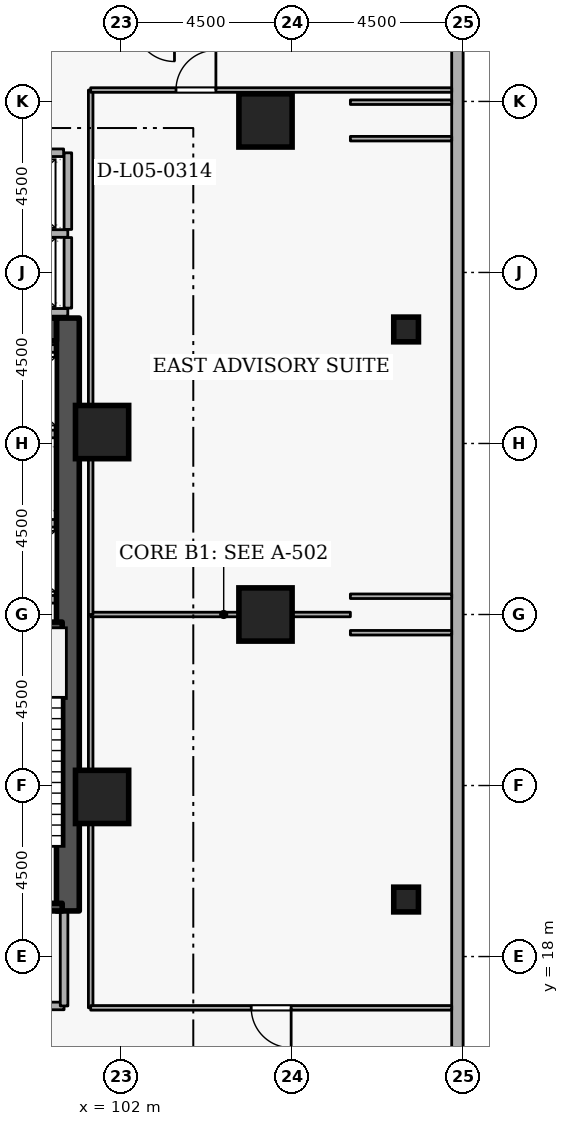
"""IFC4 building model, lengths in metres.
Left out: names, types, materials, properties, quantities, classifications, styles, units other than length and angle.
Written with IfcOpenShell. Run it as: python <this file> out.ifc"""

import sys

from ifc_helpers import new_model, si_unit, direction, frame, frame_2d, origin, origin_2d, place, context, subcontext, project, spatial, rectangle, extrude, element, fill, save


model = new_model("IFC4")
c1 = context("Model", 3, precision=1e-05, world=origin(), true_north=direction((0.0, 1.0)))
c2 = subcontext(c1, "Body", "Model", "MODEL_VIEW")
j1 = project(units=[si_unit("LENGTHUNIT", "METRE"), si_unit("PLANEANGLEUNIT", "RADIAN")], contexts=[c1])
p1 = place(None, origin())
s1 = spatial("IfcSite", under=j1, at=p1, CompositionType="ELEMENT")
p2 = place(p1, origin())
s2 = spatial("IfcBuilding", under=s1, at=p2, CompositionType="ELEMENT")
p3 = place(p2, frame((0.0, 0.0, 23.1)))
s3 = spatial("IfcBuildingStorey", under=s2, at=p3, CompositionType="ELEMENT", Elevation=23.1)
p4 = place(p3, frame((100.6, 19.2, 0.0), z_axis=(0.0, 0.0, 1.0), x_axis=(0.0, 1.0, 0.0)))
e1 = element("IfcWall", 1, at=p4, inside=s3, PredefinedType="SHEAR", context=c2, shape_type="SweptSolid", body=[
    extrude(rectangle(XDim=15.6, YDim=0.6, at=frame_2d((7.8, 0.0))), origin(), (0.0, 0.0, 1.0), 4.8),
])
p5 = place(p3, frame((94.6, 34.5, 0.0), z_axis=(0.0, 0.0, 1.0), x_axis=(1.0, 0.0, 0.0)))
e2 = element("IfcWall", 2, at=p5, inside=s3, PredefinedType="SHEAR", context=c2, shape_type="SweptSolid", body=[
    extrude(rectangle(XDim=5.7, YDim=0.6, at=frame_2d((2.85, 0.0))), origin(), (0.0, 0.0, 1.0), 4.8),
])
for number, where, z_axis, x_axis in (
    (3, (105.8, 27.0, 0.0), (0.0, 0.0, 1.0), (1.0, 0.0, 0.0)),
    (4, (105.8, 40.0, 0.0), (0.0, 0.0, 1.0), (1.0, 0.0, 0.0)),
    (5, (101.5, 22.2, 0.0), (0.0, 0.0, 1.0), (1.0, 0.0, 0.0)),
    (6, (101.5, 31.8, 0.0), (0.0, 0.0, 1.0), (1.0, 0.0, 0.0)),
):
    element("IfcColumn", number, at=place(p3, frame(where, z_axis=z_axis, x_axis=x_axis)), inside=s3, PredefinedType="COLUMN", context=c2, shape_type="SweptSolid", body=[
        extrude(rectangle(XDim=1.4, YDim=1.4, at=origin_2d()), origin(), (0.0, 0.0, 1.0), 4.8),
    ])
for number, where, z_axis, x_axis in (
    (7, (109.5, 19.5, 0.0), (0.0, 0.0, 1.0), (1.0, 0.0, 0.0)),
    (8, (109.5, 34.5, 0.0), (0.0, 0.0, 1.0), (1.0, 0.0, 0.0)),
):
    element("IfcColumn", number, at=place(p3, frame(where, z_axis=z_axis, x_axis=x_axis)), inside=s3, PredefinedType="COLUMN", context=c2, shape_type="SweptSolid", body=[
        extrude(rectangle(XDim=0.65, YDim=0.65, at=origin_2d()), origin(), (0.0, 0.0, 1.0), 4.8),
    ])
p6 = place(p3, frame((110.85, 12.32, 0.0), z_axis=(0.0, 0.0, 1.0), x_axis=(0.0, 1.0, 0.0)))
e9 = element("IfcWall", 9, at=p6, inside=s3, PredefinedType="STANDARD", context=c2, shape_type="SweptSolid", body=[
    extrude(rectangle(XDim=36.86, YDim=0.3, at=frame_2d((18.43, 0.0))), origin(), (0.0, 0.0, 1.0), 2.84),
])
p7 = place(p3, frame((97.852, 29.4, 0.0), z_axis=(0.0, 0.0, 1.0), x_axis=(1.0, 0.0, 0.0)))
e10 = element("IfcWall", 10, at=p7, inside=s3, PredefinedType="STANDARD", context=c2, shape_type="SweptSolid", body=[
    extrude(rectangle(XDim=2.436, YDim=0.2, at=frame_2d((1.218, 0.0))), origin(), (0.0, 0.0, 1.0), 4.54),
])
p8 = place(p3, frame((97.852, 27.4, 0.0), z_axis=(0.0, 0.0, 1.0), x_axis=(1.0, 0.0, 0.0)))
e11 = element("IfcWall", 11, at=p8, inside=s3, PredefinedType="STANDARD", context=c2, shape_type="SweptSolid", body=[
    extrude(rectangle(XDim=2.436, YDim=0.2, at=frame_2d((1.218, 0.0))), origin(), (0.0, 0.0, 1.0), 2.885),
])
for number, where, z_axis, x_axis in (
    (12, (97.852, 31.75, 0.0), (0.0, 0.0, 1.0), (1.0, 0.0, 0.0)),
    (13, (97.852, 34.0, 0.0), (0.0, 0.0, 1.0), (1.0, 0.0, 0.0)),
):
    element("IfcWall", number, at=place(p3, frame(where, z_axis=z_axis, x_axis=x_axis)), inside=s3, PredefinedType="STANDARD", context=c2, shape_type="SweptSolid", body=[
        extrude(rectangle(XDim=2.436, YDim=0.2, at=frame_2d((1.218, 0.0))), origin(), (0.0, 0.0, 1.0), 4.54),
    ])
for number, where, z_axis, x_axis in (
    (14, (97.852, 37.025, 0.0), (0.0, 0.0, 1.0), (1.0, 0.0, 0.0)),
    (15, (97.852, 34.95, 0.0), (0.0, 0.0, 1.0), (1.0, 0.0, 0.0)),
):
    element("IfcWall", number, at=place(p3, frame(where, z_axis=z_axis, x_axis=x_axis)), inside=s3, PredefinedType="STANDARD", context=c2, shape_type="SweptSolid", body=[
        extrude(rectangle(XDim=2.746, YDim=0.2, at=frame_2d((1.373, 0.0))), origin(), (0.0, 0.0, 1.0), 4.54),
    ])
p9 = place(p3, frame((100.6, 35.062, 0.0), z_axis=(0.0, 0.0, 1.0), x_axis=(0.0, 1.0, 0.0)))
e16 = element("IfcWall", 16, at=p9, inside=s3, PredefinedType="STANDARD", context=c2, shape_type="SweptSolid", body=[
    extrude(rectangle(XDim=1.856, YDim=0.2, at=frame_2d((0.928, 0.0))), origin(), (0.0, 0.0, 1.0), 4.54),
])
p10 = place(p3, frame((100.6, 37.132, 0.0), z_axis=(0.0, 0.0, 1.0), x_axis=(0.0, 1.0, 0.0)))
e17 = element("IfcWall", 17, at=p10, inside=s3, PredefinedType="STANDARD", context=c2, shape_type="SweptSolid", body=[
    extrude(rectangle(XDim=2.016, YDim=0.2, at=frame_2d((1.008, 0.0))), origin(), (0.0, 0.0, 1.0), 4.54),
])
p11 = place(p3, frame((97.852, 39.15, 0.0), z_axis=(0.0, 0.0, 1.0), x_axis=(1.0, 0.0, 0.0)))
e18 = element("IfcWall", 18, at=p11, inside=s3, PredefinedType="STANDARD", context=c2, shape_type="SweptSolid", body=[
    extrude(rectangle(XDim=2.636, YDim=0.2, at=frame_2d((1.318, 0.0))), origin(), (0.0, 0.0, 1.0), 4.54),
])
p12 = place(p3, frame((100.45, 19.3, 0.0), z_axis=(0.0, 0.0, 1.0), x_axis=(-1.0, 0.0, 0.0)))
e19 = element("IfcWall", 19, at=p12, inside=s3, PredefinedType="SHEAR", context=c2, shape_type="SweptSolid", body=[
    extrude(rectangle(XDim=3.35, YDim=0.2, at=frame_2d((1.675, 0.0))), origin(), (0.0, 0.0, 1.0), 4.8),
])
p13 = place(p12, frame((1.125, 0.0, 0.0)))
e20 = element("IfcOpeningElement", 20, at=p13, cuts=e19, PredefinedType="OPENING", context=c2, shape_type="SweptSolid", body=[
    extrude(rectangle(XDim=1.1, YDim=2.1, at=frame_2d((0.55, 1.05))), frame((0.0, 0.11, 0.0), z_axis=(0.0, -1.0, 0.0), x_axis=(1.0, 0.0, 0.0)), (0.0, 0.0, 1.0), 0.22),
])
p14 = place(p3, frame((97.1, 26.7, 0.0), z_axis=(0.0, 0.0, 1.0), x_axis=(1.0, 0.0, 0.0)))
e21 = element("IfcWall", 21, at=p14, inside=s3, PredefinedType="SHEAR", context=c2, shape_type="SweptSolid", body=[
    extrude(rectangle(XDim=3.35, YDim=0.2, at=frame_2d((1.675, 0.0))), origin(), (0.0, 0.0, 1.0), 4.8),
])
p15 = place(p3, frame((95.35, 16.7, 0.0), z_axis=(0.0, 0.0, 1.0), x_axis=(1.0, 0.0, 0.0)))
e22 = element("IfcWall", 22, at=p15, inside=s3, PredefinedType="STANDARD", context=c2, shape_type="SweptSolid", body=[
    extrude(rectangle(XDim=5.15, YDim=0.2, at=frame_2d((2.575, 0.0))), origin(), (0.0, 0.0, 1.0), 4.54),
])
p16 = place(p15, frame((2.0, 0.0, 0.0)))
e23 = element("IfcOpeningElement", 23, at=p16, cuts=e22, PredefinedType="OPENING", context=c2, shape_type="SweptSolid", body=[
    extrude(rectangle(XDim=1.15, YDim=2.1, at=frame_2d((0.575, 1.05))), frame((0.0, 0.11, 0.0), z_axis=(0.0, -1.0, 0.0), x_axis=(1.0, 0.0, 0.0)), (0.0, 0.0, 1.0), 0.22),
])
p17 = place(p3, frame((100.5, 16.7, 0.0), z_axis=(0.0, 0.0, 1.0), x_axis=(0.0, 1.0, 0.0)))
e24 = element("IfcWall", 24, at=p17, inside=s3, PredefinedType="STANDARD", context=c2, shape_type="SweptSolid", body=[
    extrude(rectangle(XDim=2.5, YDim=0.2, at=frame_2d((1.25, 0.0))), origin(), (0.0, 0.0, 1.0), 4.54),
])
p18 = place(p3, frame((101.2, 16.65, 0.0), z_axis=(0.0, 0.0, 1.0), x_axis=(0.0, 1.0, 0.0)))
e25 = element("IfcWall", 25, at=p18, inside=s3, PredefinedType="PARTITIONING", context=c2, shape_type="SweptSolid", body=[
    extrude(rectangle(XDim=10.35, YDim=0.12, at=frame_2d((5.175, 0.0))), origin(), (0.0, 0.0, 1.0), 2.885),
])
p19 = place(p3, frame((101.2, 27.0, 0.0), z_axis=(0.0, 0.0, 1.0), x_axis=(1.0, 0.0, 0.0)))
e26 = element("IfcWall", 26, at=p19, inside=s3, PredefinedType="PARTITIONING", context=c2, shape_type="SweptSolid", body=[
    extrude(rectangle(XDim=6.834, YDim=0.12, at=frame_2d((3.417, 0.0))), origin(), (0.0, 0.0, 1.0), 2.885),
])
p20 = place(p3, frame((108.034, 26.52, 0.0), z_axis=(0.0, 0.0, 1.0), x_axis=(1.0, 0.0, 0.0)))
e27 = element("IfcWall", 27, at=p20, inside=s3, PredefinedType="PARTITIONING", context=c2, shape_type="SweptSolid", body=[
    extrude(rectangle(XDim=2.666, YDim=0.12, at=frame_2d((1.333, 0.0))), origin(), (0.0, 0.0, 1.0), 2.885),
])
p21 = place(p3, frame((110.7, 16.65, 0.0), z_axis=(0.0, 0.0, 1.0), x_axis=(-1.0, 0.0, 0.0)))
e28 = element("IfcWall", 28, at=p21, inside=s3, PredefinedType="PARTITIONING", context=c2, shape_type="SweptSolid", body=[
    extrude(rectangle(XDim=9.5, YDim=0.12, at=frame_2d((4.75, 0.0))), origin(), (0.0, 0.0, 1.0), 4.54),
])
p22 = place(p21, frame((4.225, 0.0, 0.0)))
e29 = element("IfcOpeningElement", 29, at=p22, cuts=e28, PredefinedType="OPENING", context=c2, shape_type="SweptSolid", body=[
    extrude(rectangle(XDim=1.05, YDim=2.1, at=frame_2d((0.525, 1.05))), frame((0.0, 0.07, 0.0), z_axis=(0.0, -1.0, 0.0), x_axis=(1.0, 0.0, 0.0)), (0.0, 0.0, 1.0), 0.14),
])
p23 = place(p3, frame((101.2, 27.0, 0.0), z_axis=(0.0, 0.0, 1.0), x_axis=(0.0, 1.0, 0.0)))
e30 = element("IfcWall", 30, at=p23, inside=s3, PredefinedType="PARTITIONING", context=c2, shape_type="SweptSolid", body=[
    extrude(rectangle(XDim=13.8, YDim=0.12, at=frame_2d((6.9, 0.0))), origin(), (0.0, 0.0, 1.0), 4.54),
])
p24 = place(p3, frame((101.2, 40.8, 0.0), z_axis=(0.0, 0.0, 1.0), x_axis=(1.0, 0.0, 0.0)))
e31 = element("IfcWall", 31, at=p24, inside=s3, PredefinedType="PARTITIONING", context=c2, shape_type="SweptSolid", body=[
    extrude(rectangle(XDim=9.5, YDim=0.12, at=frame_2d((4.75, 0.0))), origin(), (0.0, 0.0, 1.0), 4.54),
])
p25 = place(p24, frame((2.245, 0.0, 0.0)))
e32 = element("IfcOpeningElement", 32, at=p25, cuts=e31, PredefinedType="OPENING", context=c2, shape_type="SweptSolid", body=[
    extrude(rectangle(XDim=1.05, YDim=2.1, at=frame_2d((0.525, 1.05))), frame((0.0, 0.07, 0.0), z_axis=(0.0, -1.0, 0.0), x_axis=(1.0, 0.0, 0.0)), (0.0, 0.0, 1.0), 0.14),
])
for number, where, z_axis, x_axis in (
    (33, (110.7, 40.48, 0.0), (0.0, 0.0, 1.0), (-1.0, 0.0, 0.0)),
    (34, (108.034, 39.52, 0.0), (0.0, 0.0, 1.0), (1.0, 0.0, 0.0)),
    (35, (110.7, 27.48, 0.0), (0.0, 0.0, 1.0), (-1.0, 0.0, 0.0)),
):
    element("IfcWall", number, at=place(p3, frame(where, z_axis=z_axis, x_axis=x_axis)), inside=s3, PredefinedType="PARTITIONING", context=c2, shape_type="SweptSolid", body=[
        extrude(rectangle(XDim=2.666, YDim=0.12, at=frame_2d((1.333, 0.0))), origin(), (0.0, 0.0, 1.0), 2.885),
    ])
p26 = place(p22, origin())
e36 = element("IfcDoor", 36, at=p26, inside=s3, OperationType="SINGLE_SWING_LEFT", PredefinedType="DOOR", context=c2, shape_type="SweptSolid", body=[
    extrude(rectangle(XDim=1.05, YDim=2.1, at=frame_2d((0.525, 1.05))), frame((0.0, 0.025, 0.0), z_axis=(0.0, -1.0, 0.0), x_axis=(1.0, 0.0, 0.0)), (0.0, 0.0, 1.0), 0.05),
])
fill(e29, e36)
p27 = place(p25, origin())
e37 = element("IfcDoor", 37, at=p27, inside=s3, OperationType="SINGLE_SWING_RIGHT", PredefinedType="DOOR", context=c2, shape_type="SweptSolid", body=[
    extrude(rectangle(XDim=1.05, YDim=2.1, at=frame_2d((0.525, 1.05))), frame((0.0, 0.025, 0.0), z_axis=(0.0, -1.0, 0.0), x_axis=(1.0, 0.0, 0.0)), (0.0, 0.0, 1.0), 0.05),
])
fill(e32, e37)
save(model, sys.argv[1])
